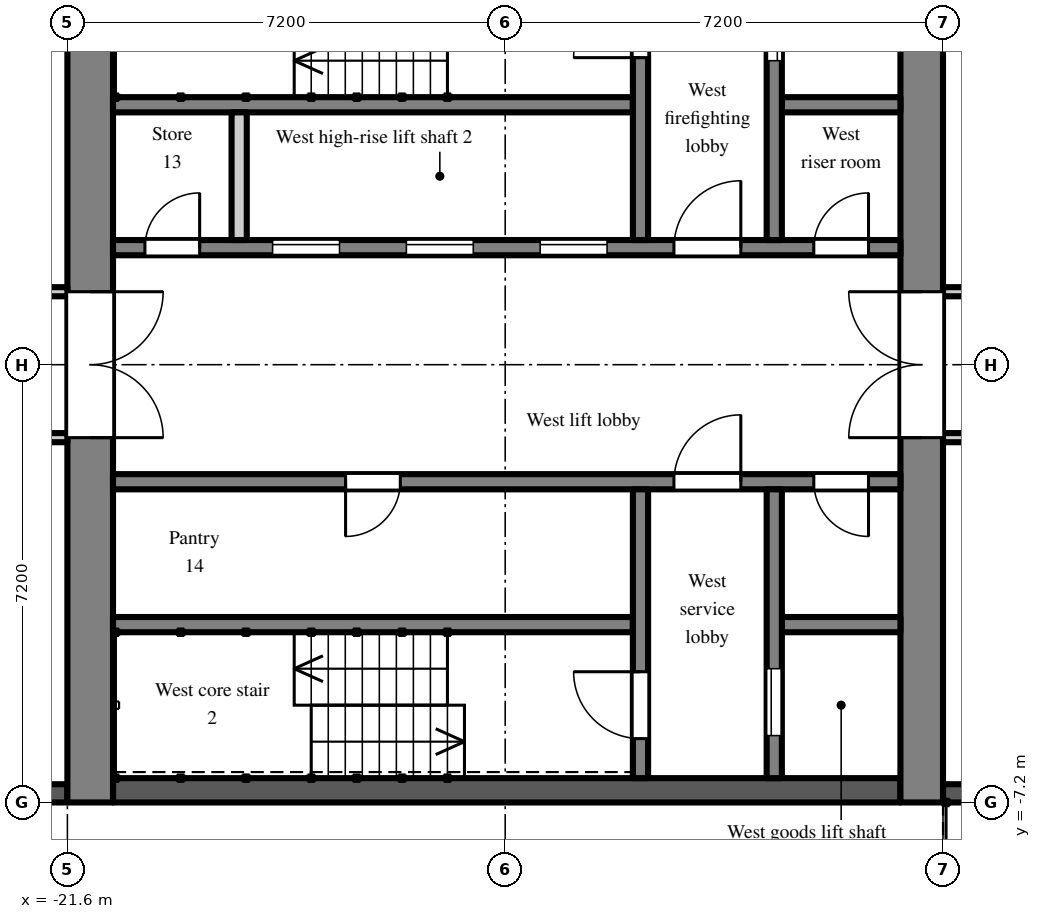
"""IFC4 building model, lengths in metres.
Left out: names, types, materials, properties, quantities, classifications, styles, units other than length and angle.
Written with IfcOpenShell. Run it as: python <this file> out.ifc"""

import sys

from ifc_helpers import new_model, si_unit, direction, frame, frame_2d, origin, place, context, subcontext, project, spatial, rectangle, extrude, element, fill, save


model = new_model("IFC4")
c1 = context("Model", 3, precision=1e-05, world=origin(), true_north=direction((0.0, 1.0)))
c2 = subcontext(c1, "Body", "Model", "MODEL_VIEW")
j1 = project(units=[si_unit("LENGTHUNIT", "METRE"), si_unit("PLANEANGLEUNIT", "RADIAN")], contexts=[c1])
p1 = place(None, origin())
s1 = spatial("IfcSite", under=j1, at=p1, CompositionType="ELEMENT")
p2 = place(p1, origin())
s2 = spatial("IfcBuilding", under=s1, at=p2, CompositionType="ELEMENT")
p3 = place(p2, frame((0.0, 0.0, 188.7)))
s3 = spatial("IfcBuildingStorey", under=s2, at=p3, CompositionType="ELEMENT", Elevation=188.7)
p4 = place(p3, frame((-24.3, -7.05, 0.0), z_axis=(0.0, 0.0, 1.0), x_axis=(1.0, 0.0, 0.0)))
e1 = element("IfcWall", 1, at=p4, inside=s3, PredefinedType="SOLIDWALL", context=c2, shape_type="SweptSolid", body=[
    extrude(rectangle(XDim=2.7, YDim=0.3, at=frame_2d((1.35, 0.0))), origin(), (0.0, 0.0, 1.0), 2.2),
])
p5 = place(p4, frame((0.75, 0.0, 0.2)))
e2 = element("IfcOpeningElement", 2, at=p5, cuts=e1, PredefinedType="OPENING", context=c2, shape_type="SweptSolid", body=[
    extrude(rectangle(XDim=1.2, YDim=1.85, at=frame_2d((0.6, 0.925))), frame((0.0, 0.16, 0.0), z_axis=(0.0, -1.0, 0.0), x_axis=(1.0, 0.0, 0.0)), (0.0, 0.0, 1.0), 0.32),
])
p6 = place(p3, frame((-7.2, -7.05, 0.0), z_axis=(0.0, 0.0, 1.0), x_axis=(1.0, 0.0, 0.0)))
e3 = element("IfcWall", 3, at=p6, inside=s3, PredefinedType="SOLIDWALL", context=c2, shape_type="SweptSolid", body=[
    extrude(rectangle(XDim=3.0, YDim=0.3, at=frame_2d((1.5, 0.0))), origin(), (0.0, 0.0, 1.0), 2.2),
])
p7 = place(p3, frame((-7.55, -7.2, 0.0), z_axis=(0.0, 0.0, 1.0), x_axis=(0.0, 1.0, 0.0)))
e4 = element("IfcWall", 4, at=p7, inside=s3, PredefinedType="SHEAR", context=c2, shape_type="SweptSolid", body=[
    extrude(rectangle(XDim=14.4, YDim=0.7, at=frame_2d((7.2, 0.0))), origin(), (0.0, 0.0, 1.0), 2.6),
])
p8 = place(p7, frame((6.0, 0.0, 0.0)))
e5 = element("IfcOpeningElement", 5, at=p8, cuts=e4, PredefinedType="OPENING", context=c2, shape_type="SweptSolid", body=[
    extrude(rectangle(XDim=2.4, YDim=2.2, at=frame_2d((1.2, 1.1))), frame((0.0, 0.36, 0.0), z_axis=(0.0, -1.0, 0.0), x_axis=(1.0, 0.0, 0.0)), (0.0, 0.0, 1.0), 0.72),
])
p9 = place(p3, frame((-21.225, -7.2, 0.0), z_axis=(0.0, 0.0, 1.0), x_axis=(0.0, 1.0, 0.0)))
e6 = element("IfcWall", 6, at=p9, inside=s3, PredefinedType="SHEAR", context=c2, shape_type="SweptSolid", body=[
    extrude(rectangle(XDim=14.4, YDim=0.75, at=frame_2d((7.2, 0.0))), origin(), (0.0, 0.0, 1.0), 2.6),
])
p10 = place(p9, frame((6.0, 0.0, 0.0)))
e7 = element("IfcOpeningElement", 7, at=p10, cuts=e6, PredefinedType="OPENING", context=c2, shape_type="SweptSolid", body=[
    extrude(rectangle(XDim=2.4, YDim=2.2, at=frame_2d((1.2, 1.1))), frame((0.0, 0.385, 0.0), z_axis=(0.0, -1.0, 0.0), x_axis=(1.0, 0.0, 0.0)), (0.0, 0.0, 1.0), 0.77),
])
p11 = place(p3, frame((-7.9, 1.925, 0.0), z_axis=(0.0, 0.0, 1.0), x_axis=(-1.0, 0.0, 0.0)))
e8 = element("IfcWall", 8, at=p11, inside=s3, PredefinedType="SHEAR", context=c2, shape_type="SweptSolid", body=[
    extrude(rectangle(XDim=12.95, YDim=0.25, at=frame_2d((6.475, 0.0))), origin(), (0.0, 0.0, 1.0), 2.6),
])
p12 = place(p11, frame((4.825, 0.0, 0.0)))
e9 = element("IfcOpeningElement", 9, at=p12, cuts=e8, PredefinedType="OPENING", context=c2, shape_type="SweptSolid", body=[
    extrude(rectangle(XDim=1.1, YDim=2.1, at=frame_2d((0.55, 1.05))), frame((0.0, 0.135, 0.0), z_axis=(0.0, -1.0, 0.0), x_axis=(1.0, 0.0, 0.0)), (0.0, 0.0, 1.0), 0.27),
])
p13 = place(p11, frame((7.025, 0.0, 0.0)))
e10 = element("IfcOpeningElement", 10, at=p13, cuts=e8, PredefinedType="OPENING", context=c2, shape_type="SweptSolid", body=[
    extrude(rectangle(XDim=1.1, YDim=2.1, at=frame_2d((0.55, 1.05))), frame((0.0, 0.135, 0.0), z_axis=(0.0, -1.0, 0.0), x_axis=(1.0, 0.0, 0.0)), (0.0, 0.0, 1.0), 0.27),
])
p14 = place(p11, frame((9.225, 0.0, 0.0)))
e11 = element("IfcOpeningElement", 11, at=p14, cuts=e8, PredefinedType="OPENING", context=c2, shape_type="SweptSolid", body=[
    extrude(rectangle(XDim=1.1, YDim=2.1, at=frame_2d((0.55, 1.05))), frame((0.0, 0.135, 0.0), z_axis=(0.0, -1.0, 0.0), x_axis=(1.0, 0.0, 0.0)), (0.0, 0.0, 1.0), 0.27),
])
p15 = place(p11, frame((0.525, 0.0, 0.0)))
e12 = element("IfcOpeningElement", 12, at=p15, cuts=e8, PredefinedType="OPENING", context=c2, shape_type="SweptSolid", body=[
    extrude(rectangle(XDim=0.9, YDim=2.1, at=frame_2d((0.45, 1.05))), frame((0.0, 0.135, 0.0), z_axis=(0.0, -1.0, 0.0), x_axis=(1.0, 0.0, 0.0)), (0.0, 0.0, 1.0), 0.27),
])
p16 = place(p11, frame((2.625, 0.0, 0.0)))
e13 = element("IfcOpeningElement", 13, at=p16, cuts=e8, PredefinedType="OPENING", context=c2, shape_type="SweptSolid", body=[
    extrude(rectangle(XDim=1.1, YDim=2.1, at=frame_2d((0.55, 1.05))), frame((0.0, 0.135, 0.0), z_axis=(0.0, -1.0, 0.0), x_axis=(1.0, 0.0, 0.0)), (0.0, 0.0, 1.0), 0.27),
])
p17 = place(p11, frame((11.525, 0.0, 0.0)))
e14 = element("IfcOpeningElement", 14, at=p17, cuts=e8, PredefinedType="OPENING", context=c2, shape_type="SweptSolid", body=[
    extrude(rectangle(XDim=0.9, YDim=2.1, at=frame_2d((0.45, 1.05))), frame((0.0, 0.135, 0.0), z_axis=(0.0, -1.0, 0.0), x_axis=(1.0, 0.0, 0.0)), (0.0, 0.0, 1.0), 0.27),
])
p18 = place(p3, frame((-7.9, 4.275, 0.0), z_axis=(0.0, 0.0, 1.0), x_axis=(-1.0, 0.0, 0.0)))
e15 = element("IfcWall", 15, at=p18, inside=s3, PredefinedType="SHEAR", context=c2, shape_type="SweptSolid", body=[
    extrude(rectangle(XDim=1.95, YDim=0.25, at=frame_2d((0.975, 0.0))), origin(), (0.0, 0.0, 1.0), 2.6),
])
p19 = place(p3, frame((-12.3, 4.275, 0.0), z_axis=(0.0, 0.0, 1.0), x_axis=(-1.0, 0.0, 0.0)))
e16 = element("IfcWall", 16, at=p19, inside=s3, PredefinedType="SHEAR", context=c2, shape_type="SweptSolid", body=[
    extrude(rectangle(XDim=8.55, YDim=0.25, at=frame_2d((4.275, 0.0))), origin(), (0.0, 0.0, 1.0), 2.6),
])
p20 = place(p3, frame((-9.975, 2.05, 0.0), z_axis=(0.0, 0.0, 1.0), x_axis=(0.0, 1.0, 0.0)))
e17 = element("IfcWall", 17, at=p20, inside=s3, PredefinedType="SHEAR", context=c2, shape_type="SweptSolid", body=[
    extrude(rectangle(XDim=4.75, YDim=0.25, at=frame_2d((2.375, 0.0))), origin(), (0.0, 0.0, 1.0), 2.6),
])
p21 = place(p20, frame((2.95, 0.0, 0.0)))
e18 = element("IfcOpeningElement", 18, at=p21, cuts=e17, PredefinedType="OPENING", context=c2, shape_type="SweptSolid", body=[
    extrude(rectangle(XDim=1.1, YDim=2.1, at=frame_2d((0.55, 1.05))), frame((0.0, 0.135, 0.0), z_axis=(0.0, -1.0, 0.0), x_axis=(1.0, 0.0, 0.0)), (0.0, 0.0, 1.0), 0.27),
])
p22 = place(p3, frame((-12.175, 2.05, 0.0), z_axis=(0.0, 0.0, 1.0), x_axis=(0.0, 1.0, 0.0)))
e19 = element("IfcWall", 19, at=p22, inside=s3, PredefinedType="SHEAR", context=c2, shape_type="SweptSolid", body=[
    extrude(rectangle(XDim=4.75, YDim=0.25, at=frame_2d((2.375, 0.0))), origin(), (0.0, 0.0, 1.0), 2.6),
])
p23 = place(p22, frame((3.0, 0.0, 0.0)))
e20 = element("IfcOpeningElement", 20, at=p23, cuts=e19, PredefinedType="OPENING", context=c2, shape_type="SweptSolid", body=[
    extrude(rectangle(XDim=1.1, YDim=2.1, at=frame_2d((0.55, 1.05))), frame((0.0, 0.135, 0.0), z_axis=(0.0, -1.0, 0.0), x_axis=(1.0, 0.0, 0.0)), (0.0, 0.0, 1.0), 0.27),
])
p24 = place(p3, frame((-18.775, 2.05, 0.0), z_axis=(0.0, 0.0, 1.0), x_axis=(0.0, 1.0, 0.0)))
e21 = element("IfcWall", 21, at=p24, inside=s3, PredefinedType="PARTITIONING", context=c2, shape_type="SweptSolid", body=[
    extrude(rectangle(XDim=2.1, YDim=0.25, at=frame_2d((1.05, 0.0))), origin(), (0.0, 0.0, 1.0), 2.6),
])
p25 = place(p3, frame((-7.9, -7.0, 0.0), z_axis=(0.0, 0.0, 1.0), x_axis=(-1.0, 0.0, 0.0)))
e22 = element("IfcWall", 22, at=p25, inside=s3, PredefinedType="SHEAR", context=c2, shape_type="SweptSolid", body=[
    extrude(rectangle(XDim=12.95, YDim=0.4, at=frame_2d((6.475, 0.0))), origin(), (0.0, 0.0, 1.0), 2.6),
])
p26 = place(p3, frame((-7.9, -1.925, 0.0), z_axis=(0.0, 0.0, 1.0), x_axis=(-1.0, 0.0, 0.0)))
e23 = element("IfcWall", 23, at=p26, inside=s3, PredefinedType="SHEAR", context=c2, shape_type="SweptSolid", body=[
    extrude(rectangle(XDim=12.95, YDim=0.25, at=frame_2d((6.475, 0.0))), origin(), (0.0, 0.0, 1.0), 2.6),
])
p27 = place(p26, frame((0.525, 0.0, 0.0)))
e24 = element("IfcOpeningElement", 24, at=p27, cuts=e23, PredefinedType="OPENING", context=c2, shape_type="SweptSolid", body=[
    extrude(rectangle(XDim=0.9, YDim=2.1, at=frame_2d((0.45, 1.05))), frame((0.0, 0.135, 0.0), z_axis=(0.0, -1.0, 0.0), x_axis=(1.0, 0.0, 0.0)), (0.0, 0.0, 1.0), 0.27),
])
p28 = place(p26, frame((2.625, 0.0, 0.0)))
e25 = element("IfcOpeningElement", 25, at=p28, cuts=e23, PredefinedType="OPENING", context=c2, shape_type="SweptSolid", body=[
    extrude(rectangle(XDim=1.1, YDim=2.1, at=frame_2d((0.55, 1.05))), frame((0.0, 0.135, 0.0), z_axis=(0.0, -1.0, 0.0), x_axis=(1.0, 0.0, 0.0)), (0.0, 0.0, 1.0), 0.27),
])
p29 = place(p26, frame((8.225, 0.0, 0.0)))
e26 = element("IfcOpeningElement", 26, at=p29, cuts=e23, PredefinedType="OPENING", context=c2, shape_type="SweptSolid", body=[
    extrude(rectangle(XDim=0.9, YDim=2.1, at=frame_2d((0.45, 1.05))), frame((0.0, 0.135, 0.0), z_axis=(0.0, -1.0, 0.0), x_axis=(1.0, 0.0, 0.0)), (0.0, 0.0, 1.0), 0.27),
])
p30 = place(p3, frame((-7.9, -4.275, 0.0), z_axis=(0.0, 0.0, 1.0), x_axis=(-1.0, 0.0, 0.0)))
e27 = element("IfcWall", 27, at=p30, inside=s3, PredefinedType="SHEAR", context=c2, shape_type="SweptSolid", body=[
    extrude(rectangle(XDim=1.95, YDim=0.25, at=frame_2d((0.975, 0.0))), origin(), (0.0, 0.0, 1.0), 2.6),
])
p31 = place(p3, frame((-12.3, -4.275, 0.0), z_axis=(0.0, 0.0, 1.0), x_axis=(-1.0, 0.0, 0.0)))
e28 = element("IfcWall", 28, at=p31, inside=s3, PredefinedType="SHEAR", context=c2, shape_type="SweptSolid", body=[
    extrude(rectangle(XDim=8.55, YDim=0.25, at=frame_2d((4.275, 0.0))), origin(), (0.0, 0.0, 1.0), 2.6),
])
p32 = place(p3, frame((-9.975, -2.05, 0.0), z_axis=(0.0, 0.0, 1.0), x_axis=(0.0, -1.0, 0.0)))
e29 = element("IfcWall", 29, at=p32, inside=s3, PredefinedType="SHEAR", context=c2, shape_type="SweptSolid", body=[
    extrude(rectangle(XDim=4.75, YDim=0.25, at=frame_2d((2.375, 0.0))), origin(), (0.0, 0.0, 1.0), 2.6),
])
p33 = place(p32, frame((2.95, 0.0, 0.0)))
e30 = element("IfcOpeningElement", 30, at=p33, cuts=e29, PredefinedType="OPENING", context=c2, shape_type="SweptSolid", body=[
    extrude(rectangle(XDim=1.1, YDim=2.1, at=frame_2d((0.55, 1.05))), frame((0.0, 0.135, 0.0), z_axis=(0.0, -1.0, 0.0), x_axis=(1.0, 0.0, 0.0)), (0.0, 0.0, 1.0), 0.27),
])
p34 = place(p3, frame((-12.175, -2.05, 0.0), z_axis=(0.0, 0.0, 1.0), x_axis=(0.0, -1.0, 0.0)))
e31 = element("IfcWall", 31, at=p34, inside=s3, PredefinedType="SHEAR", context=c2, shape_type="SweptSolid", body=[
    extrude(rectangle(XDim=4.75, YDim=0.25, at=frame_2d((2.375, 0.0))), origin(), (0.0, 0.0, 1.0), 2.6),
])
p35 = place(p34, frame((3.0, 0.0, 0.0)))
e32 = element("IfcOpeningElement", 32, at=p35, cuts=e31, PredefinedType="OPENING", context=c2, shape_type="SweptSolid", body=[
    extrude(rectangle(XDim=1.1, YDim=2.1, at=frame_2d((0.55, 1.05))), frame((0.0, 0.135, 0.0), z_axis=(0.0, -1.0, 0.0), x_axis=(1.0, 0.0, 0.0)), (0.0, 0.0, 1.0), 0.27),
])
p36 = place(p3, frame((-36.5, -1.2, 0.0), z_axis=(0.0, 0.0, 1.0), x_axis=(1.0, 0.0, 0.0)))
e33 = element("IfcWall", 33, at=p36, inside=s3, PredefinedType="PARTITIONING", context=c2, shape_type="SweptSolid", body=[
    extrude(rectangle(XDim=14.9, YDim=0.15, at=frame_2d((7.45, 0.0))), origin(), (0.0, 0.0, 1.0), 2.6),
])
p37 = place(p36, frame((12.65, 0.0, 0.0)))
e34 = element("IfcOpeningElement", 34, at=p37, cuts=e33, PredefinedType="OPENING", context=c2, shape_type="SweptSolid", body=[
    extrude(rectangle(XDim=0.9, YDim=2.1, at=frame_2d((0.45, 1.05))), frame((0.0, 0.085, 0.0), z_axis=(0.0, -1.0, 0.0), x_axis=(1.0, 0.0, 0.0)), (0.0, 0.0, 1.0), 0.17),
])
p38 = place(p36, frame((9.05, 0.0, 0.0)))
e35 = element("IfcOpeningElement", 35, at=p38, cuts=e33, PredefinedType="OPENING", context=c2, shape_type="SweptSolid", body=[
    extrude(rectangle(XDim=0.9, YDim=2.1, at=frame_2d((0.45, 1.05))), frame((0.0, 0.085, 0.0), z_axis=(0.0, -1.0, 0.0), x_axis=(1.0, 0.0, 0.0)), (0.0, 0.0, 1.0), 0.17),
])
p39 = place(p36, frame((5.45, 0.0, 0.0)))
e36 = element("IfcOpeningElement", 36, at=p39, cuts=e33, PredefinedType="OPENING", context=c2, shape_type="SweptSolid", body=[
    extrude(rectangle(XDim=0.9, YDim=2.1, at=frame_2d((0.45, 1.05))), frame((0.0, 0.085, 0.0), z_axis=(0.0, -1.0, 0.0), x_axis=(1.0, 0.0, 0.0)), (0.0, 0.0, 1.0), 0.17),
])
p40 = place(p36, frame((1.15, 0.0, 0.0)))
e37 = element("IfcOpeningElement", 37, at=p40, cuts=e33, PredefinedType="OPENING", context=c2, shape_type="SweptSolid", body=[
    extrude(rectangle(XDim=1.8, YDim=2.1, at=frame_2d((0.9, 1.05))), frame((0.0, 0.085, 0.0), z_axis=(0.0, -1.0, 0.0), x_axis=(1.0, 0.0, 0.0)), (0.0, 0.0, 1.0), 0.17),
])
p41 = place(p3, frame((-36.5, 1.2, 0.0), z_axis=(0.0, 0.0, 1.0), x_axis=(1.0, 0.0, 0.0)))
e38 = element("IfcWall", 38, at=p41, inside=s3, PredefinedType="PARTITIONING", context=c2, shape_type="SweptSolid", body=[
    extrude(rectangle(XDim=14.9, YDim=0.15, at=frame_2d((7.45, 0.0))), origin(), (0.0, 0.0, 1.0), 2.6),
])
p42 = place(p41, frame((10.1, 0.0, 0.0)))
e39 = element("IfcOpeningElement", 39, at=p42, cuts=e38, PredefinedType="OPENING", context=c2, shape_type="SweptSolid", body=[
    extrude(rectangle(XDim=1.0, YDim=2.1, at=frame_2d((0.5, 1.05))), frame((0.0, 0.085, 0.0), z_axis=(0.0, -1.0, 0.0), x_axis=(1.0, 0.0, 0.0)), (0.0, 0.0, 1.0), 0.17),
])
p43 = place(p41, frame((4.7, 0.0, 0.0)))
e40 = element("IfcOpeningElement", 40, at=p43, cuts=e38, PredefinedType="OPENING", context=c2, shape_type="SweptSolid", body=[
    extrude(rectangle(XDim=1.0, YDim=2.1, at=frame_2d((0.5, 1.05))), frame((0.0, 0.085, 0.0), z_axis=(0.0, -1.0, 0.0), x_axis=(1.0, 0.0, 0.0)), (0.0, 0.0, 1.0), 0.17),
])
p44 = place(p41, frame((1.15, 0.0, 0.0)))
e41 = element("IfcOpeningElement", 41, at=p44, cuts=e38, PredefinedType="OPENING", context=c2, shape_type="SweptSolid", body=[
    extrude(rectangle(XDim=1.8, YDim=2.1, at=frame_2d((0.9, 1.05))), frame((0.0, 0.085, 0.0), z_axis=(0.0, -1.0, 0.0), x_axis=(1.0, 0.0, 0.0)), (0.0, 0.0, 1.0), 0.17),
])
p45 = place(p3, frame((-7.2, -1.2, 0.0), z_axis=(0.0, 0.0, 1.0), x_axis=(1.0, 0.0, 0.0)))
e42 = element("IfcWall", 42, at=p45, inside=s3, PredefinedType="PARTITIONING", context=c2, shape_type="SweptSolid", body=[
    extrude(rectangle(XDim=6.075, YDim=0.15, at=frame_2d((3.038, 0.0))), origin(), (0.0, 0.0, 1.0), 2.6),
])
p46 = place(p45, frame((2.55, 0.0, 0.0)))
e43 = element("IfcOpeningElement", 43, at=p46, cuts=e42, PredefinedType="OPENING", context=c2, shape_type="SweptSolid", body=[
    extrude(rectangle(XDim=0.9, YDim=2.1, at=frame_2d((0.45, 1.05))), frame((0.0, 0.085, 0.0), z_axis=(0.0, -1.0, 0.0), x_axis=(1.0, 0.0, 0.0)), (0.0, 0.0, 1.0), 0.17),
])
p47 = place(p3, frame((-7.2, 1.2, 0.0), z_axis=(0.0, 0.0, 1.0), x_axis=(1.0, 0.0, 0.0)))
e44 = element("IfcWall", 44, at=p47, inside=s3, PredefinedType="PARTITIONING", context=c2, shape_type="SweptSolid", body=[
    extrude(rectangle(XDim=6.075, YDim=0.15, at=frame_2d((3.038, 0.0))), origin(), (0.0, 0.0, 1.0), 2.6),
])
p48 = place(p47, frame((0.55, 0.0, 0.0)))
e45 = element("IfcOpeningElement", 45, at=p48, cuts=e44, PredefinedType="OPENING", context=c2, shape_type="SweptSolid", body=[
    extrude(rectangle(XDim=0.9, YDim=2.1, at=frame_2d((0.45, 1.05))), frame((0.0, 0.085, 0.0), z_axis=(0.0, -1.0, 0.0), x_axis=(1.0, 0.0, 0.0)), (0.0, 0.0, 1.0), 0.17),
])
p49 = place(p12, origin())
e46 = element("IfcDoor", 46, at=p49, inside=s3, OperationType="SLIDING_TO_LEFT", PredefinedType="DOOR", context=c2, shape_type="SweptSolid", body=[
    extrude(rectangle(XDim=1.1, YDim=2.1, at=frame_2d((0.55, 1.05))), frame((0.0, 0.025, 0.0), z_axis=(0.0, -1.0, 0.0), x_axis=(1.0, 0.0, 0.0)), (0.0, 0.0, 1.0), 0.05),
])
fill(e9, e46)
p50 = place(p13, origin())
e47 = element("IfcDoor", 47, at=p50, inside=s3, OperationType="SLIDING_TO_LEFT", PredefinedType="DOOR", context=c2, shape_type="SweptSolid", body=[
    extrude(rectangle(XDim=1.1, YDim=2.1, at=frame_2d((0.55, 1.05))), frame((0.0, 0.025, 0.0), z_axis=(0.0, -1.0, 0.0), x_axis=(1.0, 0.0, 0.0)), (0.0, 0.0, 1.0), 0.05),
])
fill(e10, e47)
p51 = place(p14, origin())
e48 = element("IfcDoor", 48, at=p51, inside=s3, OperationType="SLIDING_TO_LEFT", PredefinedType="DOOR", context=c2, shape_type="SweptSolid", body=[
    extrude(rectangle(XDim=1.1, YDim=2.1, at=frame_2d((0.55, 1.05))), frame((0.0, 0.025, 0.0), z_axis=(0.0, -1.0, 0.0), x_axis=(1.0, 0.0, 0.0)), (0.0, 0.0, 1.0), 0.05),
])
fill(e11, e48)
p52 = place(p21, origin())
e49 = element("IfcDoor", 49, at=p52, inside=s3, OperationType="SLIDING_TO_LEFT", PredefinedType="DOOR", context=c2, shape_type="SweptSolid", body=[
    extrude(rectangle(XDim=1.1, YDim=2.1, at=frame_2d((0.55, 1.05))), frame((0.0, 0.025, 0.0), z_axis=(0.0, -1.0, 0.0), x_axis=(1.0, 0.0, 0.0)), (0.0, 0.0, 1.0), 0.05),
])
fill(e18, e49)
p53 = place(p33, origin())
e50 = element("IfcDoor", 50, at=p53, inside=s3, OperationType="SLIDING_TO_LEFT", PredefinedType="DOOR", context=c2, shape_type="SweptSolid", body=[
    extrude(rectangle(XDim=1.1, YDim=2.1, at=frame_2d((0.55, 1.05))), frame((0.0, 0.025, 0.0), z_axis=(0.0, -1.0, 0.0), x_axis=(1.0, 0.0, 0.0)), (0.0, 0.0, 1.0), 0.05),
])
fill(e30, e50)
p54 = place(p23, origin())
e51 = element("IfcDoor", 51, at=p54, inside=s3, OperationType="SINGLE_SWING_LEFT", PredefinedType="DOOR", context=c2, shape_type="SweptSolid", body=[
    extrude(rectangle(XDim=1.1, YDim=2.1, at=frame_2d((0.55, 1.05))), frame((0.0, 0.025, 0.0), z_axis=(0.0, -1.0, 0.0), x_axis=(1.0, 0.0, 0.0)), (0.0, 0.0, 1.0), 0.05),
])
fill(e20, e51)
p55 = place(p35, frame((1.1, 0.0, 0.0), z_axis=(0.0, 0.0, 1.0), x_axis=(-1.0, 0.0, 0.0)))
e52 = element("IfcDoor", 52, at=p55, inside=s3, OperationType="SINGLE_SWING_RIGHT", PredefinedType="DOOR", context=c2, shape_type="SweptSolid", body=[
    extrude(rectangle(XDim=1.1, YDim=2.1, at=frame_2d((0.55, 1.05))), frame((0.0, 0.025, 0.0), z_axis=(0.0, -1.0, 0.0), x_axis=(1.0, 0.0, 0.0)), (0.0, 0.0, 1.0), 0.05),
])
fill(e32, e52)
p56 = place(p15, frame((0.9, 0.0, 0.0), z_axis=(0.0, 0.0, 1.0), x_axis=(-1.0, 0.0, 0.0)))
e53 = element("IfcDoor", 53, at=p56, inside=s3, OperationType="SINGLE_SWING_RIGHT", PredefinedType="DOOR", context=c2, shape_type="SweptSolid", body=[
    extrude(rectangle(XDim=0.9, YDim=2.1, at=frame_2d((0.45, 1.05))), frame((0.0, 0.025, 0.0), z_axis=(0.0, -1.0, 0.0), x_axis=(1.0, 0.0, 0.0)), (0.0, 0.0, 1.0), 0.05),
])
fill(e12, e53)
p57 = place(p27, origin())
e54 = element("IfcDoor", 54, at=p57, inside=s3, OperationType="SINGLE_SWING_LEFT", PredefinedType="DOOR", context=c2, shape_type="SweptSolid", body=[
    extrude(rectangle(XDim=0.9, YDim=2.1, at=frame_2d((0.45, 1.05))), frame((0.0, 0.025, 0.0), z_axis=(0.0, -1.0, 0.0), x_axis=(1.0, 0.0, 0.0)), (0.0, 0.0, 1.0), 0.05),
])
fill(e24, e54)
p58 = place(p16, frame((1.1, 0.0, 0.0), z_axis=(0.0, 0.0, 1.0), x_axis=(-1.0, 0.0, 0.0)))
e55 = element("IfcDoor", 55, at=p58, inside=s3, OperationType="SINGLE_SWING_RIGHT", PredefinedType="DOOR", context=c2, shape_type="SweptSolid", body=[
    extrude(rectangle(XDim=1.1, YDim=2.1, at=frame_2d((0.55, 1.05))), frame((0.0, 0.025, 0.0), z_axis=(0.0, -1.0, 0.0), x_axis=(1.0, 0.0, 0.0)), (0.0, 0.0, 1.0), 0.05),
])
fill(e13, e55)
p59 = place(p28, frame((1.1, 0.0, 0.0), z_axis=(0.0, 0.0, 1.0), x_axis=(-1.0, 0.0, 0.0)))
e56 = element("IfcDoor", 56, at=p59, inside=s3, OperationType="SINGLE_SWING_RIGHT", PredefinedType="DOOR", context=c2, shape_type="SweptSolid", body=[
    extrude(rectangle(XDim=1.1, YDim=2.1, at=frame_2d((0.55, 1.05))), frame((0.0, 0.025, 0.0), z_axis=(0.0, -1.0, 0.0), x_axis=(1.0, 0.0, 0.0)), (0.0, 0.0, 1.0), 0.05),
])
fill(e25, e56)
p60 = place(p8, origin())
e57 = element("IfcDoor", 57, at=p60, inside=s3, OperationType="DOUBLE_DOOR_DOUBLE_SWING", PredefinedType="DOOR", context=c2, shape_type="SweptSolid", body=[
    extrude(rectangle(XDim=2.4, YDim=2.2, at=frame_2d((1.2, 1.1))), frame((0.0, 0.025, 0.0), z_axis=(0.0, -1.0, 0.0), x_axis=(1.0, 0.0, 0.0)), (0.0, 0.0, 1.0), 0.05),
])
fill(e5, e57)
p61 = place(p10, frame((2.4, 0.0, 0.0), z_axis=(0.0, 0.0, 1.0), x_axis=(-1.0, 0.0, 0.0)))
e58 = element("IfcDoor", 58, at=p61, inside=s3, OperationType="DOUBLE_DOOR_DOUBLE_SWING", PredefinedType="DOOR", context=c2, shape_type="SweptSolid", body=[
    extrude(rectangle(XDim=2.4, YDim=2.2, at=frame_2d((1.2, 1.1))), frame((0.0, 0.025, 0.0), z_axis=(0.0, -1.0, 0.0), x_axis=(1.0, 0.0, 0.0)), (0.0, 0.0, 1.0), 0.05),
])
fill(e7, e58)
p62 = place(p17, frame((0.9, 0.0, 0.0), z_axis=(0.0, 0.0, 1.0), x_axis=(-1.0, 0.0, 0.0)))
e59 = element("IfcDoor", 59, at=p62, inside=s3, OperationType="SINGLE_SWING_RIGHT", PredefinedType="DOOR", context=c2, shape_type="SweptSolid", body=[
    extrude(rectangle(XDim=0.9, YDim=2.1, at=frame_2d((0.45, 1.05))), frame((0.0, 0.025, 0.0), z_axis=(0.0, -1.0, 0.0), x_axis=(1.0, 0.0, 0.0)), (0.0, 0.0, 1.0), 0.05),
])
fill(e14, e59)
p63 = place(p29, origin())
e60 = element("IfcDoor", 60, at=p63, inside=s3, OperationType="SINGLE_SWING_RIGHT", PredefinedType="DOOR", context=c2, shape_type="SweptSolid", body=[
    extrude(rectangle(XDim=0.9, YDim=2.1, at=frame_2d((0.45, 1.05))), frame((0.0, 0.025, 0.0), z_axis=(0.0, -1.0, 0.0), x_axis=(1.0, 0.0, 0.0)), (0.0, 0.0, 1.0), 0.05),
])
fill(e26, e60)
save(model, sys.argv[1])
